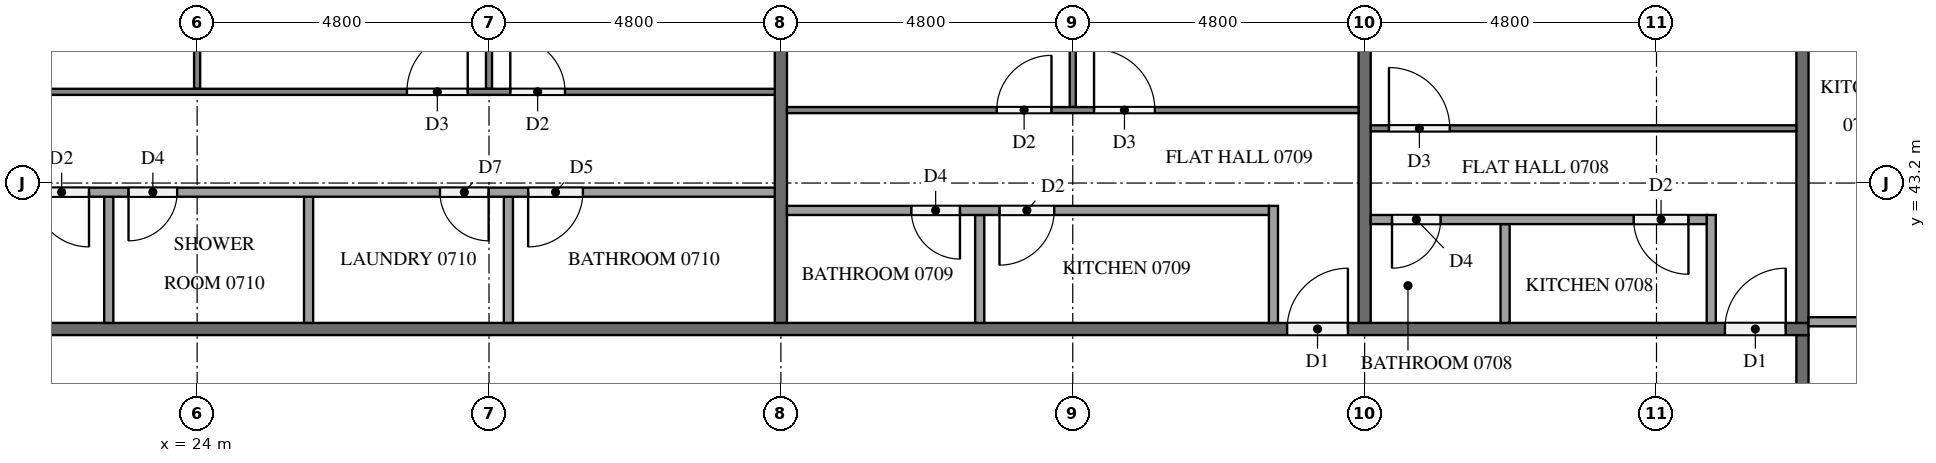
"""IFC4 building model, lengths in metres.
Left out: names, types, materials, properties, quantities, classifications, styles, units other than length and angle.
Written with IfcOpenShell. Run it as: python <this file> out.ifc"""

import sys

from ifc_helpers import new_model, si_unit, direction, frame, frame_2d, origin, place, context, subcontext, project, spatial, rectangle, extrude, element, fill, save


model = new_model("IFC4")
c1 = context("Model", 3, precision=1e-05, world=origin(), true_north=direction((0.0, 1.0)))
c2 = subcontext(c1, "Body", "Model", "MODEL_VIEW")
j1 = project(units=[si_unit("LENGTHUNIT", "METRE"), si_unit("PLANEANGLEUNIT", "RADIAN")], contexts=[c1])
p1 = place(None, origin())
s1 = spatial("IfcSite", under=j1, at=p1, CompositionType="ELEMENT")
p2 = place(p1, origin())
s2 = spatial("IfcBuilding", under=s1, at=p2, CompositionType="ELEMENT")
p3 = place(p2, frame((0.0, 0.0, 32.9)))
s3 = spatial("IfcBuildingStorey", under=s2, at=p3, CompositionType="ELEMENT", Elevation=32.9)
p4 = place(p3, frame((50.4, 40.7, 0.0), z_axis=(0.0, 0.0, 1.0), x_axis=(0.0, -1.0, 0.0)))
e1 = element("IfcWall", 1, at=p4, inside=s3, PredefinedType="PARTITIONING", context=c2, shape_type="SweptSolid", body=[
    extrude(rectangle(XDim=28.6, YDim=0.2, at=frame_2d((14.3, 0.0))), origin(), (0.0, 0.0, 1.0), 3.2),
])
p5 = place(p4, frame((27.375, 0.0, 0.0)))
e2 = element("IfcOpeningElement", 2, at=p5, cuts=e1, PredefinedType="OPENING", context=c2, shape_type="SweptSolid", body=[
    extrude(rectangle(XDim=1.1, YDim=2.1, at=frame_2d((0.55, 1.05))), frame((0.0, 0.11, 0.0), z_axis=(0.0, -1.0, 0.0), x_axis=(1.0, 0.0, 0.0)), (0.0, 0.0, 1.0), 0.22),
])
p6 = place(p4, frame((8.225, 0.0, 0.0)))
e3 = element("IfcOpeningElement", 3, at=p6, cuts=e1, PredefinedType="OPENING", context=c2, shape_type="SweptSolid", body=[
    extrude(rectangle(XDim=1.0, YDim=2.1, at=frame_2d((0.5, 1.05))), frame((0.0, 0.11, 0.0), z_axis=(0.0, -1.0, 0.0), x_axis=(1.0, 0.0, 0.0)), (0.0, 0.0, 1.0), 0.22),
])
p7 = place(p3, frame((11.9, 40.8, 0.0), z_axis=(0.0, 0.0, 1.0), x_axis=(1.0, 0.0, 0.0)))
e4 = element("IfcWall", 4, at=p7, inside=s3, PredefinedType="PARTITIONING", context=c2, shape_type="SweptSolid", body=[
    extrude(rectangle(XDim=38.6, YDim=0.2, at=frame_2d((19.3, 0.0))), origin(), (0.0, 0.0, 1.0), 3.2),
])
p8 = place(p7, frame((37.225, 0.0, 0.0)))
e5 = element("IfcOpeningElement", 5, at=p8, cuts=e4, PredefinedType="OPENING", context=c2, shape_type="SweptSolid", body=[
    extrude(rectangle(XDim=1.0, YDim=2.1, at=frame_2d((0.5, 1.05))), frame((0.0, 0.11, 0.0), z_axis=(0.0, -1.0, 0.0), x_axis=(1.0, 0.0, 0.0)), (0.0, 0.0, 1.0), 0.22),
])
p9 = place(p7, frame((30.025, 0.0, 0.0)))
e6 = element("IfcOpeningElement", 6, at=p9, cuts=e4, PredefinedType="OPENING", context=c2, shape_type="SweptSolid", body=[
    extrude(rectangle(XDim=1.0, YDim=2.1, at=frame_2d((0.5, 1.05))), frame((0.0, 0.11, 0.0), z_axis=(0.0, -1.0, 0.0), x_axis=(1.0, 0.0, 0.0)), (0.0, 0.0, 1.0), 0.22),
])
p10 = place(p7, frame((2.725, 0.0, 0.0)))
e7 = element("IfcOpeningElement", 7, at=p10, cuts=e4, PredefinedType="OPENING", context=c2, shape_type="SweptSolid", body=[
    extrude(rectangle(XDim=1.1, YDim=2.1, at=frame_2d((0.55, 1.05))), frame((0.0, 0.11, 0.0), z_axis=(0.0, -1.0, 0.0), x_axis=(1.0, 0.0, 0.0)), (0.0, 0.0, 1.0), 0.22),
])
p11 = place(p7, frame((1.225, 0.0, 0.0)))
e8 = element("IfcOpeningElement", 8, at=p11, cuts=e4, PredefinedType="OPENING", context=c2, shape_type="SweptSolid", body=[
    extrude(rectangle(XDim=1.0, YDim=2.1, at=frame_2d((0.5, 1.05))), frame((0.0, 0.11, 0.0), z_axis=(0.0, -1.0, 0.0), x_axis=(1.0, 0.0, 0.0)), (0.0, 0.0, 1.0), 0.22),
])
p12 = place(p3, frame((50.4, 40.9, 0.0), z_axis=(0.0, 0.0, 1.0), x_axis=(0.0, 1.0, 0.0)))
e9 = element("IfcWall", 9, at=p12, inside=s3, PredefinedType="PARTITIONING", context=c2, shape_type="SweptSolid", body=[
    extrude(rectangle(XDim=7.0, YDim=0.2, at=frame_2d((3.5, 0.0))), origin(), (0.0, 0.0, 1.0), 3.2),
])
for number, where, z_axis, x_axis in (
    (10, (43.2, 47.55, 0.0), (0.0, 0.0, 1.0), (0.0, -1.0, 0.0)),
    (11, (33.6, 47.55, 0.0), (0.0, 0.0, 1.0), (0.0, -1.0, 0.0)),
):
    element("IfcWall", number, at=place(p3, frame(where, z_axis=z_axis, x_axis=x_axis)), inside=s3, PredefinedType="PARTITIONING", context=c2, shape_type="SweptSolid", body=[
        extrude(rectangle(XDim=6.65, YDim=0.2, at=frame_2d((3.325, 0.0))), origin(), (0.0, 0.0, 1.0), 3.2),
    ])
p13 = place(p3, frame((50.5, 40.919, 0.0), z_axis=(0.0, 0.0, 1.0), x_axis=(1.0, 0.0, 0.0)))
e12 = element("IfcWall", 12, at=p13, inside=s3, PredefinedType="PARTITIONING", context=c2, shape_type="SweptSolid", body=[
    extrude(rectangle(XDim=1.775, YDim=0.15, at=frame_2d((0.887, 0.0))), origin(), (0.0, 0.0, 1.0), 3.2),
])
p14 = place(p3, frame((43.3, 44.1, 0.0), z_axis=(0.0, 0.0, 1.0), x_axis=(1.0, 0.0, 0.0)))
e13 = element("IfcWall", 13, at=p14, inside=s3, PredefinedType="PARTITIONING", context=c2, shape_type="SweptSolid", body=[
    extrude(rectangle(XDim=7.0, YDim=0.1, at=frame_2d((3.5, 0.0))), origin(), (0.0, 0.0, 1.0), 3.2),
])
p15 = place(p14, frame((0.3, 0.0, 0.0)))
e14 = element("IfcOpeningElement", 14, at=p15, cuts=e13, PredefinedType="OPENING", context=c2, shape_type="SweptSolid", body=[
    extrude(rectangle(XDim=1.0, YDim=2.1, at=frame_2d((0.5, 1.05))), frame((0.0, 0.06, 0.0), z_axis=(0.0, -1.0, 0.0), x_axis=(1.0, 0.0, 0.0)), (0.0, 0.0, 1.0), 0.12),
])
p16 = place(p3, frame((45.51, 40.9, 0.0), z_axis=(0.0, 0.0, 1.0), x_axis=(0.0, 1.0, 0.0)))
e15 = element("IfcWall", 15, at=p16, inside=s3, PredefinedType="PARTITIONING", context=c2, shape_type="SweptSolid", body=[
    extrude(rectangle(XDim=1.625, YDim=0.15, at=frame_2d((0.812, 0.0))), origin(), (0.0, 0.0, 1.0), 3.2),
])
p17 = place(p3, frame((48.9, 40.9, 0.0), z_axis=(0.0, 0.0, 1.0), x_axis=(0.0, 1.0, 0.0)))
e16 = element("IfcWall", 16, at=p17, inside=s3, PredefinedType="PARTITIONING", context=c2, shape_type="SweptSolid", body=[
    extrude(rectangle(XDim=1.775, YDim=0.15, at=frame_2d((0.888, 0.0))), origin(), (0.0, 0.0, 1.0), 3.2),
])
p18 = place(p3, frame((48.825, 42.6, 0.0), z_axis=(0.0, 0.0, 1.0), x_axis=(-1.0, 0.0, 0.0)))
e17 = element("IfcWall", 17, at=p18, inside=s3, PredefinedType="PARTITIONING", context=c2, shape_type="SweptSolid", body=[
    extrude(rectangle(XDim=5.525, YDim=0.15, at=frame_2d((2.762, 0.0))), origin(), (0.0, 0.0, 1.0), 3.2),
])
p19 = place(p18, frame((0.3, 0.0, 0.0)))
e18 = element("IfcOpeningElement", 18, at=p19, cuts=e17, PredefinedType="OPENING", context=c2, shape_type="SweptSolid", body=[
    extrude(rectangle(XDim=0.9, YDim=2.1, at=frame_2d((0.45, 1.05))), frame((0.0, 0.085, 0.0), z_axis=(0.0, -1.0, 0.0), x_axis=(1.0, 0.0, 0.0)), (0.0, 0.0, 1.0), 0.17),
])
p20 = place(p18, frame((4.375, 0.0, 0.0)))
e19 = element("IfcOpeningElement", 19, at=p20, cuts=e17, PredefinedType="OPENING", context=c2, shape_type="SweptSolid", body=[
    extrude(rectangle(XDim=0.8, YDim=2.1, at=frame_2d((0.4, 1.05))), frame((0.0, 0.085, 0.0), z_axis=(0.0, -1.0, 0.0), x_axis=(1.0, 0.0, 0.0)), (0.0, 0.0, 1.0), 0.17),
])
p21 = place(p3, frame((38.4, 44.45, 0.0), z_axis=(0.0, 0.0, 1.0), x_axis=(0.0, 1.0, 0.0)))
e20 = element("IfcWall", 20, at=p21, inside=s3, PredefinedType="PARTITIONING", context=c2, shape_type="SweptSolid", body=[
    extrude(rectangle(XDim=3.45, YDim=0.1, at=frame_2d((1.725, 0.0))), origin(), (0.0, 0.0, 1.0), 3.2),
])
p22 = place(p3, frame((33.7, 44.4, 0.0), z_axis=(0.0, 0.0, 1.0), x_axis=(1.0, 0.0, 0.0)))
e21 = element("IfcWall", 21, at=p22, inside=s3, PredefinedType="PARTITIONING", context=c2, shape_type="SweptSolid", body=[
    extrude(rectangle(XDim=9.4, YDim=0.1, at=frame_2d((4.7, 0.0))), origin(), (0.0, 0.0, 1.0), 3.2),
])
p23 = place(p22, frame((5.05, 0.0, 0.0)))
e22 = element("IfcOpeningElement", 22, at=p23, cuts=e21, PredefinedType="OPENING", context=c2, shape_type="SweptSolid", body=[
    extrude(rectangle(XDim=1.0, YDim=2.1, at=frame_2d((0.5, 1.05))), frame((0.0, 0.06, 0.0), z_axis=(0.0, -1.0, 0.0), x_axis=(1.0, 0.0, 0.0)), (0.0, 0.0, 1.0), 0.12),
])
p24 = place(p22, frame((3.45, 0.0, 0.0)))
e23 = element("IfcOpeningElement", 23, at=p24, cuts=e21, PredefinedType="OPENING", context=c2, shape_type="SweptSolid", body=[
    extrude(rectangle(XDim=0.9, YDim=2.1, at=frame_2d((0.45, 1.05))), frame((0.0, 0.06, 0.0), z_axis=(0.0, -1.0, 0.0), x_axis=(1.0, 0.0, 0.0)), (0.0, 0.0, 1.0), 0.12),
])
p25 = place(p3, frame((36.87, 40.9, 0.0), z_axis=(0.0, 0.0, 1.0), x_axis=(0.0, 1.0, 0.0)))
e24 = element("IfcWall", 24, at=p25, inside=s3, PredefinedType="PARTITIONING", context=c2, shape_type="SweptSolid", body=[
    extrude(rectangle(XDim=1.775, YDim=0.15, at=frame_2d((0.888, 0.0))), origin(), (0.0, 0.0, 1.0), 3.2),
])
p26 = place(p3, frame((41.7, 40.9, 0.0), z_axis=(0.0, 0.0, 1.0), x_axis=(0.0, 1.0, 0.0)))
e25 = element("IfcWall", 25, at=p26, inside=s3, PredefinedType="PARTITIONING", context=c2, shape_type="SweptSolid", body=[
    extrude(rectangle(XDim=1.925, YDim=0.15, at=frame_2d((0.962, 0.0))), origin(), (0.0, 0.0, 1.0), 3.2),
])
p27 = place(p3, frame((41.625, 42.75, 0.0), z_axis=(0.0, 0.0, 1.0), x_axis=(-1.0, 0.0, 0.0)))
e26 = element("IfcWall", 26, at=p27, inside=s3, PredefinedType="PARTITIONING", context=c2, shape_type="SweptSolid", body=[
    extrude(rectangle(XDim=7.925, YDim=0.15, at=frame_2d((3.962, 0.0))), origin(), (0.0, 0.0, 1.0), 3.2),
])
p28 = place(p27, frame((3.53, 0.0, 0.0)))
e27 = element("IfcOpeningElement", 27, at=p28, cuts=e26, PredefinedType="OPENING", context=c2, shape_type="SweptSolid", body=[
    extrude(rectangle(XDim=0.9, YDim=2.1, at=frame_2d((0.45, 1.05))), frame((0.0, 0.085, 0.0), z_axis=(0.0, -1.0, 0.0), x_axis=(1.0, 0.0, 0.0)), (0.0, 0.0, 1.0), 0.17),
])
p29 = place(p27, frame((5.08, 0.0, 0.0)))
e28 = element("IfcOpeningElement", 28, at=p29, cuts=e26, PredefinedType="OPENING", context=c2, shape_type="SweptSolid", body=[
    extrude(rectangle(XDim=0.8, YDim=2.1, at=frame_2d((0.4, 1.05))), frame((0.0, 0.085, 0.0), z_axis=(0.0, -1.0, 0.0), x_axis=(1.0, 0.0, 0.0)), (0.0, 0.0, 1.0), 0.17),
])
p30 = place(p3, frame((24.0, 44.75, 0.0), z_axis=(0.0, 0.0, 1.0), x_axis=(0.0, 1.0, 0.0)))
e29 = element("IfcWall", 29, at=p30, inside=s3, PredefinedType="PARTITIONING", context=c2, shape_type="SweptSolid", body=[
    extrude(rectangle(XDim=2.8, YDim=0.1, at=frame_2d((1.4, 0.0))), origin(), (0.0, 0.0, 1.0), 3.2),
])
p31 = place(p3, frame((28.8, 44.75, 0.0), z_axis=(0.0, 0.0, 1.0), x_axis=(0.0, 1.0, 0.0)))
e30 = element("IfcWall", 30, at=p31, inside=s3, PredefinedType="PARTITIONING", context=c2, shape_type="SweptSolid", body=[
    extrude(rectangle(XDim=3.15, YDim=0.1, at=frame_2d((1.575, 0.0))), origin(), (0.0, 0.0, 1.0), 3.2),
])
p32 = place(p3, frame((14.5, 44.7, 0.0), z_axis=(0.0, 0.0, 1.0), x_axis=(1.0, 0.0, 0.0)))
e31 = element("IfcWall", 31, at=p32, inside=s3, PredefinedType="PARTITIONING", context=c2, shape_type="SweptSolid", body=[
    extrude(rectangle(XDim=19.0, YDim=0.1, at=frame_2d((9.5, 0.0))), origin(), (0.0, 0.0, 1.0), 3.2),
])
p33 = place(p32, frame((3.45, 0.0, 0.0)))
e32 = element("IfcOpeningElement", 32, at=p33, cuts=e31, PredefinedType="OPENING", context=c2, shape_type="SweptSolid", body=[
    extrude(rectangle(XDim=0.9, YDim=2.1, at=frame_2d((0.45, 1.05))), frame((0.0, 0.06, 0.0), z_axis=(0.0, -1.0, 0.0), x_axis=(1.0, 0.0, 0.0)), (0.0, 0.0, 1.0), 0.12),
])
p34 = place(p32, frame((5.05, 0.0, 0.0)))
e33 = element("IfcOpeningElement", 33, at=p34, cuts=e31, PredefinedType="OPENING", context=c2, shape_type="SweptSolid", body=[
    extrude(rectangle(XDim=0.9, YDim=2.1, at=frame_2d((0.45, 1.05))), frame((0.0, 0.06, 0.0), z_axis=(0.0, -1.0, 0.0), x_axis=(1.0, 0.0, 0.0)), (0.0, 0.0, 1.0), 0.12),
])
p35 = place(p32, frame((12.95, 0.0, 0.0)))
e34 = element("IfcOpeningElement", 34, at=p35, cuts=e31, PredefinedType="OPENING", context=c2, shape_type="SweptSolid", body=[
    extrude(rectangle(XDim=1.0, YDim=2.1, at=frame_2d((0.5, 1.05))), frame((0.0, 0.06, 0.0), z_axis=(0.0, -1.0, 0.0), x_axis=(1.0, 0.0, 0.0)), (0.0, 0.0, 1.0), 0.12),
])
p36 = place(p32, frame((14.65, 0.0, 0.0)))
e35 = element("IfcOpeningElement", 35, at=p36, cuts=e31, PredefinedType="OPENING", context=c2, shape_type="SweptSolid", body=[
    extrude(rectangle(XDim=0.9, YDim=2.1, at=frame_2d((0.45, 1.05))), frame((0.0, 0.06, 0.0), z_axis=(0.0, -1.0, 0.0), x_axis=(1.0, 0.0, 0.0)), (0.0, 0.0, 1.0), 0.12),
])
for number, where, z_axis, x_axis in (
    (36, (22.547, 40.9, 0.0), (0.0, 0.0, 1.0), (0.0, 1.0, 0.0)),
    (37, (25.833, 40.9, 0.0), (0.0, 0.0, 1.0), (0.0, 1.0, 0.0)),
    (38, (29.119, 40.9, 0.0), (0.0, 0.0, 1.0), (0.0, 1.0, 0.0)),
):
    element("IfcWall", number, at=place(p3, frame(where, z_axis=z_axis, x_axis=x_axis)), inside=s3, PredefinedType="PARTITIONING", context=c2, shape_type="SweptSolid", body=[
        extrude(rectangle(XDim=2.075, YDim=0.15, at=frame_2d((1.038, 0.0))), origin(), (0.0, 0.0, 1.0), 3.2),
    ])
p37 = place(p3, frame((33.5, 43.05, 0.0), z_axis=(0.0, 0.0, 1.0), x_axis=(-1.0, 0.0, 0.0)))
e39 = element("IfcWall", 39, at=p37, inside=s3, PredefinedType="PARTITIONING", context=c2, shape_type="SweptSolid", body=[
    extrude(rectangle(XDim=17.525, YDim=0.15, at=frame_2d((8.762, 0.0))), origin(), (0.0, 0.0, 1.0), 3.2),
])
p38 = place(p37, frame((11.278, 0.0, 0.0)))
e40 = element("IfcOpeningElement", 40, at=p38, cuts=e39, PredefinedType="OPENING", context=c2, shape_type="SweptSolid", body=[
    extrude(rectangle(XDim=0.9, YDim=2.1, at=frame_2d((0.45, 1.05))), frame((0.0, 0.085, 0.0), z_axis=(0.0, -1.0, 0.0), x_axis=(1.0, 0.0, 0.0)), (0.0, 0.0, 1.0), 0.17),
])
p39 = place(p37, frame((9.828, 0.0, 0.0)))
e41 = element("IfcOpeningElement", 41, at=p39, cuts=e39, PredefinedType="OPENING", context=c2, shape_type="SweptSolid", body=[
    extrude(rectangle(XDim=0.8, YDim=2.1, at=frame_2d((0.4, 1.05))), frame((0.0, 0.085, 0.0), z_axis=(0.0, -1.0, 0.0), x_axis=(1.0, 0.0, 0.0)), (0.0, 0.0, 1.0), 0.17),
])
p40 = place(p37, frame((4.706, 0.0, 0.0)))
e42 = element("IfcOpeningElement", 42, at=p40, cuts=e39, PredefinedType="OPENING", context=c2, shape_type="SweptSolid", body=[
    extrude(rectangle(XDim=0.8, YDim=2.1, at=frame_2d((0.4, 1.05))), frame((0.0, 0.085, 0.0), z_axis=(0.0, -1.0, 0.0), x_axis=(1.0, 0.0, 0.0)), (0.0, 0.0, 1.0), 0.17),
])
p41 = place(p37, frame((3.156, 0.0, 0.0)))
e43 = element("IfcOpeningElement", 43, at=p41, cuts=e39, PredefinedType="OPENING", context=c2, shape_type="SweptSolid", body=[
    extrude(rectangle(XDim=0.9, YDim=2.1, at=frame_2d((0.45, 1.05))), frame((0.0, 0.085, 0.0), z_axis=(0.0, -1.0, 0.0), x_axis=(1.0, 0.0, 0.0)), (0.0, 0.0, 1.0), 0.17),
])
p42 = place(p8, origin())
e44 = element("IfcDoor", 44, at=p42, inside=s3, OperationType="SINGLE_SWING_RIGHT", PredefinedType="DOOR", context=c2, shape_type="SweptSolid", body=[
    extrude(rectangle(XDim=1.0, YDim=2.1, at=frame_2d((0.5, 1.05))), frame((0.0, 0.025, 0.0), z_axis=(0.0, -1.0, 0.0), x_axis=(1.0, 0.0, 0.0)), (0.0, 0.0, 1.0), 0.05),
])
fill(e5, e44)
p43 = place(p9, origin())
e45 = element("IfcDoor", 45, at=p43, inside=s3, OperationType="SINGLE_SWING_RIGHT", PredefinedType="DOOR", context=c2, shape_type="SweptSolid", body=[
    extrude(rectangle(XDim=1.0, YDim=2.1, at=frame_2d((0.5, 1.05))), frame((0.0, 0.025, 0.0), z_axis=(0.0, -1.0, 0.0), x_axis=(1.0, 0.0, 0.0)), (0.0, 0.0, 1.0), 0.05),
])
fill(e6, e45)
p44 = place(p15, origin())
e46 = element("IfcDoor", 46, at=p44, inside=s3, OperationType="SINGLE_SWING_LEFT", PredefinedType="DOOR", context=c2, shape_type="SweptSolid", body=[
    extrude(rectangle(XDim=1.0, YDim=2.1, at=frame_2d((0.5, 1.05))), frame((0.0, 0.025, 0.0), z_axis=(0.0, -1.0, 0.0), x_axis=(1.0, 0.0, 0.0)), (0.0, 0.0, 1.0), 0.05),
])
fill(e14, e46)
p45 = place(p19, origin())
e47 = element("IfcDoor", 47, at=p45, inside=s3, OperationType="SINGLE_SWING_LEFT", PredefinedType="DOOR", context=c2, shape_type="SweptSolid", body=[
    extrude(rectangle(XDim=0.9, YDim=2.1, at=frame_2d((0.45, 1.05))), frame((0.0, 0.025, 0.0), z_axis=(0.0, -1.0, 0.0), x_axis=(1.0, 0.0, 0.0)), (0.0, 0.0, 1.0), 0.05),
])
fill(e18, e47)
p46 = place(p20, origin())
e48 = element("IfcDoor", 48, at=p46, inside=s3, OperationType="SINGLE_SWING_RIGHT", PredefinedType="DOOR", context=c2, shape_type="SweptSolid", body=[
    extrude(rectangle(XDim=0.8, YDim=2.1, at=frame_2d((0.4, 1.05))), frame((0.0, 0.025, 0.0), z_axis=(0.0, -1.0, 0.0), x_axis=(1.0, 0.0, 0.0)), (0.0, 0.0, 1.0), 0.05),
])
fill(e19, e48)
p47 = place(p23, origin())
e49 = element("IfcDoor", 49, at=p47, inside=s3, OperationType="SINGLE_SWING_LEFT", PredefinedType="DOOR", context=c2, shape_type="SweptSolid", body=[
    extrude(rectangle(XDim=1.0, YDim=2.1, at=frame_2d((0.5, 1.05))), frame((0.0, 0.025, 0.0), z_axis=(0.0, -1.0, 0.0), x_axis=(1.0, 0.0, 0.0)), (0.0, 0.0, 1.0), 0.05),
])
fill(e22, e49)
p48 = place(p24, origin())
e50 = element("IfcDoor", 50, at=p48, inside=s3, OperationType="SINGLE_SWING_RIGHT", PredefinedType="DOOR", context=c2, shape_type="SweptSolid", body=[
    extrude(rectangle(XDim=0.9, YDim=2.1, at=frame_2d((0.45, 1.05))), frame((0.0, 0.025, 0.0), z_axis=(0.0, -1.0, 0.0), x_axis=(1.0, 0.0, 0.0)), (0.0, 0.0, 1.0), 0.05),
])
fill(e23, e50)
p49 = place(p28, origin())
e51 = element("IfcDoor", 51, at=p49, inside=s3, OperationType="SINGLE_SWING_RIGHT", PredefinedType="DOOR", context=c2, shape_type="SweptSolid", body=[
    extrude(rectangle(XDim=0.9, YDim=2.1, at=frame_2d((0.45, 1.05))), frame((0.0, 0.025, 0.0), z_axis=(0.0, -1.0, 0.0), x_axis=(1.0, 0.0, 0.0)), (0.0, 0.0, 1.0), 0.05),
])
fill(e27, e51)
p50 = place(p29, origin())
e52 = element("IfcDoor", 52, at=p50, inside=s3, OperationType="SINGLE_SWING_LEFT", PredefinedType="DOOR", context=c2, shape_type="SweptSolid", body=[
    extrude(rectangle(XDim=0.8, YDim=2.1, at=frame_2d((0.4, 1.05))), frame((0.0, 0.025, 0.0), z_axis=(0.0, -1.0, 0.0), x_axis=(1.0, 0.0, 0.0)), (0.0, 0.0, 1.0), 0.05),
])
fill(e28, e52)
p51 = place(p35, origin())
e53 = element("IfcDoor", 53, at=p51, inside=s3, OperationType="SINGLE_SWING_RIGHT", PredefinedType="DOOR", context=c2, shape_type="SweptSolid", body=[
    extrude(rectangle(XDim=1.0, YDim=2.1, at=frame_2d((0.5, 1.05))), frame((0.0, 0.025, 0.0), z_axis=(0.0, -1.0, 0.0), x_axis=(1.0, 0.0, 0.0)), (0.0, 0.0, 1.0), 0.05),
])
fill(e34, e53)
p52 = place(p36, origin())
e54 = element("IfcDoor", 54, at=p52, inside=s3, OperationType="SINGLE_SWING_LEFT", PredefinedType="DOOR", context=c2, shape_type="SweptSolid", body=[
    extrude(rectangle(XDim=0.9, YDim=2.1, at=frame_2d((0.45, 1.05))), frame((0.0, 0.025, 0.0), z_axis=(0.0, -1.0, 0.0), x_axis=(1.0, 0.0, 0.0)), (0.0, 0.0, 1.0), 0.05),
])
fill(e35, e54)
p53 = place(p38, origin())
e55 = element("IfcDoor", 55, at=p53, inside=s3, OperationType="SINGLE_SWING_LEFT", PredefinedType="DOOR", context=c2, shape_type="SweptSolid", body=[
    extrude(rectangle(XDim=0.9, YDim=2.1, at=frame_2d((0.45, 1.05))), frame((0.0, 0.025, 0.0), z_axis=(0.0, -1.0, 0.0), x_axis=(1.0, 0.0, 0.0)), (0.0, 0.0, 1.0), 0.05),
])
fill(e40, e55)
p54 = place(p39, origin())
e56 = element("IfcDoor", 56, at=p54, inside=s3, OperationType="SINGLE_SWING_RIGHT", PredefinedType="DOOR", context=c2, shape_type="SweptSolid", body=[
    extrude(rectangle(XDim=0.8, YDim=2.1, at=frame_2d((0.4, 1.05))), frame((0.0, 0.025, 0.0), z_axis=(0.0, -1.0, 0.0), x_axis=(1.0, 0.0, 0.0)), (0.0, 0.0, 1.0), 0.05),
])
fill(e41, e56)
p55 = place(p40, origin())
e57 = element("IfcDoor", 57, at=p55, inside=s3, OperationType="SINGLE_SWING_LEFT", PredefinedType="DOOR", context=c2, shape_type="SweptSolid", body=[
    extrude(rectangle(XDim=0.8, YDim=2.1, at=frame_2d((0.4, 1.05))), frame((0.0, 0.025, 0.0), z_axis=(0.0, -1.0, 0.0), x_axis=(1.0, 0.0, 0.0)), (0.0, 0.0, 1.0), 0.05),
])
fill(e42, e57)
p56 = place(p41, origin())
e58 = element("IfcDoor", 58, at=p56, inside=s3, OperationType="SINGLE_SWING_RIGHT", PredefinedType="DOOR", context=c2, shape_type="SweptSolid", body=[
    extrude(rectangle(XDim=0.9, YDim=2.1, at=frame_2d((0.45, 1.05))), frame((0.0, 0.025, 0.0), z_axis=(0.0, -1.0, 0.0), x_axis=(1.0, 0.0, 0.0)), (0.0, 0.0, 1.0), 0.05),
])
fill(e43, e58)
save(model, sys.argv[1])
